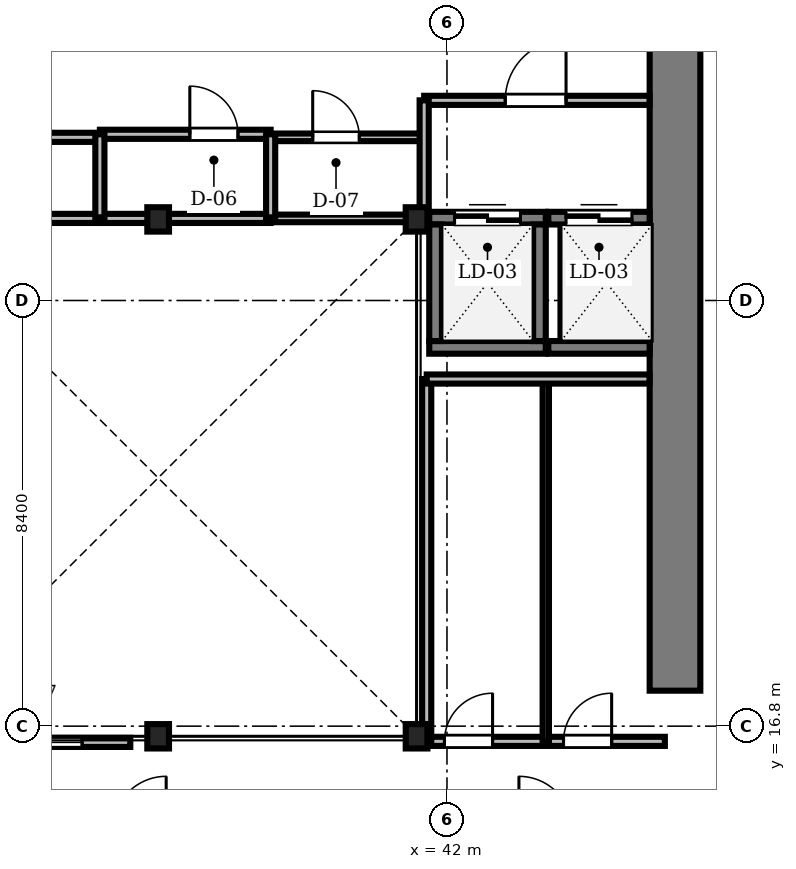
"""IFC4 building model, lengths in metres.
Left out: names, types, materials, properties, quantities, classifications, styles, units other than length and angle.
Written with IfcOpenShell. Run it as: python <this file> out.ifc"""

import sys

from ifc_helpers import new_model, si_unit, direction, frame, frame_2d, origin, origin_2d, place, context, subcontext, project, spatial, rectangle, i_section, extrude, source, transform, mapped, element, fill, save


model = new_model("IFC4")
c1 = context("Model", 3, precision=1e-05, world=origin(), true_north=direction((0.0, 1.0)))
c2 = subcontext(c1, "Body", "Model", "MODEL_VIEW")
j1 = project(units=[si_unit("LENGTHUNIT", "METRE"), si_unit("PLANEANGLEUNIT", "RADIAN")], contexts=[c1])
p1 = place(None, origin())
s1 = spatial("IfcSite", under=j1, at=p1, CompositionType="ELEMENT")
p2 = place(p1, origin())
s2 = spatial("IfcBuilding", under=s1, at=p2, CompositionType="ELEMENT")
p3 = place(p2, frame((0.0, 0.0, 78.7)))
s3 = spatial("IfcBuildingStorey", under=s2, at=p3, CompositionType="ELEMENT", Elevation=78.7)
m1 = source(origin(), c2, "Body", "SweptSolid", [
    extrude(rectangle(XDim=13.15, YDim=1.0, at=frame_2d((6.575, 0.0))), origin(), (0.0, 0.0, 1.0), 3.41),
])
p4 = place(p3, frame((46.5, 17.5, 0.0), z_axis=(0.0, 0.0, 1.0), x_axis=(0.0, 1.0, 0.0)))
e1 = element("IfcWall", 1, at=p4, inside=s3, PredefinedType="SHEAR", context=c2, shape_type="MappedRepresentation", body=[
    mapped(m1, transform((0.0, 0.0, 0.0), scale=1.0)),
])
m2 = source(origin(), c2, "Body", "SweptSolid", [
    extrude(i_section(OverallWidth=0.428, OverallDepth=0.481, WebThickness=0.04, FlangeThickness=0.063, FilletRadius=0.015, at=origin_2d()), origin(), (0.0, 0.0, 1.0), 3.41),
])
for number, where, z_axis, x_axis in (
    (2, (36.3, 16.6, 0.0), (0.0, 0.0, 1.0), (1.0, 0.0, 0.0)),
    (3, (41.4, 16.6, 0.0), (0.0, 0.0, 1.0), (1.0, 0.0, 0.0)),
    (4, (41.4, 26.8, 0.0), (0.0, 0.0, 1.0), (1.0, 0.0, 0.0)),
    (5, (36.3, 26.8, 0.0), (0.0, 0.0, 1.0), (1.0, 0.0, 0.0)),
):
    element("IfcColumn", number, at=place(p3, frame(where, z_axis=z_axis, x_axis=x_axis)), inside=s3, PredefinedType="COLUMN", context=c2, shape_type="MappedRepresentation", body=[
        mapped(m2, transform((0.0, 0.0, 0.0), scale=1.0)),
    ])
m3 = source(origin(), c2, "Body", "SweptSolid", [
    extrude(rectangle(XDim=2.3, YDim=0.25, at=frame_2d((1.15, 0.0))), origin(), (0.0, 0.0, 1.0), 3.41),
])
p5 = place(p3, frame((41.65, 24.275, 0.0), z_axis=(0.0, 0.0, 1.0), x_axis=(1.0, 0.0, 0.0)))
e6 = element("IfcWall", 6, at=p5, inside=s3, PredefinedType="SOLIDWALL", context=c2, shape_type="MappedRepresentation", body=[
    mapped(m3, transform((0.0, 0.0, 0.0), scale=1.0)),
])
p6 = place(p3, frame((41.65, 26.825, 0.0), z_axis=(0.0, 0.0, 1.0), x_axis=(1.0, 0.0, 0.0)))
e7 = element("IfcWall", 7, at=p6, inside=s3, PredefinedType="SOLIDWALL", context=c2, shape_type="MappedRepresentation", body=[
    mapped(m3, transform((0.0, 0.0, 0.0), scale=1.0)),
])
m4 = source(origin(), c2, "Body", "SweptSolid", [
    extrude(rectangle(XDim=1.3, YDim=2.3, at=frame_2d((0.65, 1.15))), frame((0.0, 0.135, 0.0), z_axis=(0.0, -1.0, 0.0), x_axis=(1.0, 0.0, 0.0)), (0.0, 0.0, 1.0), 0.27),
])
p7 = place(p6, frame((0.5, 0.0, 0.0)))
e8 = element("IfcOpeningElement", 8, at=p7, cuts=e7, PredefinedType="OPENING", context=c2, shape_type="MappedRepresentation", body=[
    mapped(m4, transform((0.0, 0.0, 0.0), scale=1.0)),
])
for number, where, z_axis, x_axis in (
    (9, (41.775, 24.4, 0.0), (0.0, 0.0, 1.0), (0.0, 1.0, 0.0)),
    (10, (43.825, 24.4, 0.0), (0.0, 0.0, 1.0), (0.0, 1.0, 0.0)),
):
    element("IfcWall", number, at=place(p3, frame(where, z_axis=z_axis, x_axis=x_axis)), inside=s3, PredefinedType="SOLIDWALL", context=c2, shape_type="MappedRepresentation", body=[
        mapped(m3, transform((0.0, 0.0, 0.0), scale=1.0)),
    ])
m5 = source(origin(), c2, "Body", "SweptSolid", [
    extrude(rectangle(XDim=2.0, YDim=0.25, at=frame_2d((1.0, 0.0))), origin(), (0.0, 0.0, 1.0), 3.41),
])
p8 = place(p3, frame((44.0, 24.275, 0.0), z_axis=(0.0, 0.0, 1.0), x_axis=(1.0, 0.0, 0.0)))
e11 = element("IfcWall", 11, at=p8, inside=s3, PredefinedType="SOLIDWALL", context=c2, shape_type="MappedRepresentation", body=[
    mapped(m5, transform((0.0, 0.0, 0.0), scale=1.0)),
])
p9 = place(p3, frame((44.0, 26.825, 0.0), z_axis=(0.0, 0.0, 1.0), x_axis=(1.0, 0.0, 0.0)))
e12 = element("IfcWall", 12, at=p9, inside=s3, PredefinedType="SOLIDWALL", context=c2, shape_type="MappedRepresentation", body=[
    mapped(m5, transform((0.0, 0.0, 0.0), scale=1.0)),
])
p10 = place(p9, frame((0.35, 0.0, 0.0)))
e13 = element("IfcOpeningElement", 13, at=p10, cuts=e12, PredefinedType="OPENING", context=c2, shape_type="MappedRepresentation", body=[
    mapped(m4, transform((0.0, 0.0, 0.0), scale=1.0)),
])
m6 = source(origin(), c2, "Body", "SweptSolid", [
    extrude(rectangle(XDim=4.448, YDim=0.18, at=frame_2d((2.224, 0.0))), origin(), (0.0, 0.0, 1.0), 3.042),
])
p11 = place(p3, frame((41.55, 29.15, 0.0), z_axis=(0.0, 0.0, 1.0), x_axis=(1.0, 0.0, 0.0)))
e14 = element("IfcWall", 14, at=p11, inside=s3, PredefinedType="PARTITIONING", context=c2, shape_type="MappedRepresentation", body=[
    mapped(m6, transform((0.0, 0.0, 0.0), scale=1.0)),
])
m7 = source(origin(), c2, "Body", "SweptSolid", [
    extrude(rectangle(XDim=1.2, YDim=2.2, at=frame_2d((0.6, 1.1))), frame((0.0, 0.1, 0.0), z_axis=(0.0, -1.0, 0.0), x_axis=(1.0, 0.0, 0.0)), (0.0, 0.0, 1.0), 0.2),
])
p12 = place(p11, frame((1.6, 0.0, 0.0)))
e15 = element("IfcOpeningElement", 15, at=p12, cuts=e14, PredefinedType="OPENING", context=c2, shape_type="MappedRepresentation", body=[
    mapped(m7, transform((0.0, 0.0, 0.0), scale=1.0)),
])
m8 = source(origin(), c2, "Body", "SweptSolid", [
    extrude(rectangle(XDim=4.7, YDim=0.18, at=frame_2d((2.35, 0.0))), origin(), (0.0, 0.0, 1.0), 2.802),
])
p13 = place(p3, frame((41.6, 16.5, 0.0), z_axis=(0.0, 0.0, 1.0), x_axis=(1.0, 0.0, 0.0)))
e16 = element("IfcWall", 16, at=p13, inside=s3, PredefinedType="PARTITIONING", context=c2, shape_type="MappedRepresentation", body=[
    mapped(m8, transform((0.0, 0.0, 0.0), scale=1.0)),
])
m9 = source(origin(), c2, "Body", "SweptSolid", [
    extrude(rectangle(XDim=0.95, YDim=2.15, at=frame_2d((0.475, 1.075))), frame((0.0, 0.1, 0.0), z_axis=(0.0, -1.0, 0.0), x_axis=(1.0, 0.0, 0.0)), (0.0, 0.0, 1.0), 0.2),
])
p14 = place(p13, frame((0.35, 0.0, 0.0)))
e17 = element("IfcOpeningElement", 17, at=p14, cuts=e16, PredefinedType="OPENING", context=c2, shape_type="MappedRepresentation", body=[
    mapped(m9, transform((0.0, 0.0, 0.0), scale=1.0)),
])
p15 = place(p13, frame((2.7, 0.0, 0.0)))
e18 = element("IfcOpeningElement", 18, at=p15, cuts=e16, PredefinedType="OPENING", context=c2, shape_type="MappedRepresentation", body=[
    mapped(m9, transform((0.0, 0.0, 0.0), scale=1.0)),
])
m10 = source(origin(), c2, "Body", "SweptSolid", [
    extrude(rectangle(XDim=3.7, YDim=0.18, at=frame_2d((1.85, 0.0))), origin(), (0.0, 0.0, 1.0), 3.042),
])
p16 = place(p3, frame((31.45, 28.42, 0.0), z_axis=(0.0, 0.0, 1.0), x_axis=(1.0, 0.0, 0.0)))
e19 = element("IfcWall", 19, at=p16, inside=s3, PredefinedType="PARTITIONING", context=c2, shape_type="MappedRepresentation", body=[
    mapped(m10, transform((0.0, 0.0, 0.0), scale=1.0)),
])
m11 = source(origin(), c2, "Body", "SweptSolid", [
    extrude(rectangle(XDim=0.92, YDim=2.1, at=frame_2d((0.46, 1.05))), frame((0.0, 0.1, 0.0), z_axis=(0.0, -1.0, 0.0), x_axis=(1.0, 0.0, 0.0)), (0.0, 0.0, 1.0), 0.2),
])
p17 = place(p16, frame((0.9, 0.0, 0.0)))
e20 = element("IfcOpeningElement", 20, at=p17, cuts=e19, PredefinedType="OPENING", context=c2, shape_type="MappedRepresentation", body=[
    mapped(m11, transform((0.0, 0.0, 0.0), scale=1.0)),
])
m12 = source(origin(), c2, "Body", "SweptSolid", [
    extrude(rectangle(XDim=3.37, YDim=0.18, at=frame_2d((1.685, 0.0))), origin(), (0.0, 0.0, 1.0), 3.41),
])
p18 = place(p3, frame((35.15, 28.48, 0.0), z_axis=(0.0, 0.0, 1.0), x_axis=(1.0, 0.0, 0.0)))
e21 = element("IfcWall", 21, at=p18, inside=s3, PredefinedType="PARTITIONING", context=c2, shape_type="MappedRepresentation", body=[
    mapped(m12, transform((0.0, 0.0, 0.0), scale=1.0)),
])
p19 = place(p18, frame((1.775, 0.0, 0.0)))
e22 = element("IfcOpeningElement", 22, at=p19, cuts=e21, PredefinedType="OPENING", context=c2, shape_type="MappedRepresentation", body=[
    mapped(m9, transform((0.0, 0.0, 0.0), scale=1.0)),
])
m13 = source(origin(), c2, "Body", "SweptSolid", [
    extrude(rectangle(XDim=3.0, YDim=0.15, at=frame_2d((1.5, 0.0))), origin(), (0.0, 0.0, 1.0), 3.41),
])
p20 = place(p3, frame((38.52, 28.42, 0.0), z_axis=(0.0, 0.0, 1.0), x_axis=(1.0, 0.0, 0.0)))
e23 = element("IfcWall", 23, at=p20, inside=s3, PredefinedType="PARTITIONING", context=c2, shape_type="MappedRepresentation", body=[
    mapped(m13, transform((0.0, 0.0, 0.0), scale=1.0)),
])
m14 = source(origin(), c2, "Body", "SweptSolid", [
    extrude(rectangle(XDim=0.92, YDim=2.1, at=frame_2d((0.46, 1.05))), frame((0.0, 0.085, 0.0), z_axis=(0.0, -1.0, 0.0), x_axis=(1.0, 0.0, 0.0)), (0.0, 0.0, 1.0), 0.17),
])
p21 = place(p20, frame((0.83, 0.0, 0.0)))
e24 = element("IfcOpeningElement", 24, at=p21, cuts=e23, PredefinedType="OPENING", context=c2, shape_type="MappedRepresentation", body=[
    mapped(m14, transform((0.0, 0.0, 0.0), scale=1.0)),
])
m15 = source(origin(), c2, "Body", "SweptSolid", [
    extrude(rectangle(XDim=7.15, YDim=0.18, at=frame_2d((3.575, 0.0))), origin(), (0.0, 0.0, 1.0), 2.802),
])
p22 = place(p3, frame((41.6, 16.5, 0.0), z_axis=(0.0, 0.0, 1.0), x_axis=(0.0, 1.0, 0.0)))
e25 = element("IfcWall", 25, at=p22, inside=s3, PredefinedType="PARTITIONING", context=c2, shape_type="MappedRepresentation", body=[
    mapped(m15, transform((0.0, 0.0, 0.0), scale=1.0)),
])
m16 = source(origin(), c2, "Body", "SweptSolid", [
    extrude(rectangle(XDim=7.15, YDim=0.125, at=frame_2d((3.575, 0.0))), origin(), (0.0, 0.0, 1.0), 2.802),
])
p23 = place(p3, frame((43.95, 16.5, 0.0), z_axis=(0.0, 0.0, 1.0), x_axis=(0.0, 1.0, 0.0)))
e26 = element("IfcWall", 26, at=p23, inside=s3, PredefinedType="PARTITIONING", context=c2, shape_type="MappedRepresentation", body=[
    mapped(m16, transform((0.0, 0.0, 0.0), scale=1.0)),
])
m17 = source(origin(), c2, "Body", "SweptSolid", [
    extrude(rectangle(XDim=4.398, YDim=0.18, at=frame_2d((2.199, 0.0))), origin(), (0.0, 0.0, 1.0), 3.41),
])
p24 = place(p3, frame((41.6, 23.65, 0.0), z_axis=(0.0, 0.0, 1.0), x_axis=(1.0, 0.0, 0.0)))
e27 = element("IfcWall", 27, at=p24, inside=s3, PredefinedType="PARTITIONING", context=c2, shape_type="MappedRepresentation", body=[
    mapped(m17, transform((0.0, 0.0, 0.0), scale=1.0)),
])
m18 = source(origin(), c2, "Body", "SweptSolid", [
    extrude(rectangle(XDim=3.7, YDim=0.18, at=frame_2d((1.85, 0.0))), origin(), (0.0, 0.0, 1.0), 2.952),
])
p25 = place(p3, frame((31.45, 26.82, 0.0), z_axis=(0.0, 0.0, 1.0), x_axis=(1.0, 0.0, 0.0)))
e28 = element("IfcWall", 28, at=p25, inside=s3, PredefinedType="PARTITIONING", context=c2, shape_type="MappedRepresentation", body=[
    mapped(m18, transform((0.0, 0.0, 0.0), scale=1.0)),
])
m19 = source(origin(), c2, "Body", "SweptSolid", [
    extrude(rectangle(XDim=3.37, YDim=0.18, at=frame_2d((1.685, 0.0))), origin(), (0.0, 0.0, 1.0), 2.952),
])
p26 = place(p3, frame((35.15, 26.82, 0.0), z_axis=(0.0, 0.0, 1.0), x_axis=(1.0, 0.0, 0.0)))
e29 = element("IfcWall", 29, at=p26, inside=s3, PredefinedType="PARTITIONING", context=c2, shape_type="MappedRepresentation", body=[
    mapped(m19, transform((0.0, 0.0, 0.0), scale=1.0)),
])
m20 = source(origin(), c2, "Body", "SweptSolid", [
    extrude(rectangle(XDim=3.0, YDim=0.15, at=frame_2d((1.5, 0.0))), origin(), (0.0, 0.0, 1.0), 2.802),
])
p27 = place(p3, frame((38.52, 26.82, 0.0), z_axis=(0.0, 0.0, 1.0), x_axis=(1.0, 0.0, 0.0)))
e30 = element("IfcWall", 30, at=p27, inside=s3, PredefinedType="PARTITIONING", context=c2, shape_type="MappedRepresentation", body=[
    mapped(m20, transform((0.0, 0.0, 0.0), scale=1.0)),
])
m21 = source(origin(), c2, "Body", "SweptSolid", [
    extrude(rectangle(XDim=2.35, YDim=0.18, at=frame_2d((1.175, 0.0))), origin(), (0.0, 0.0, 1.0), 2.802),
])
p28 = place(p3, frame((41.55, 26.8, 0.0), z_axis=(0.0, 0.0, 1.0), x_axis=(0.0, 1.0, 0.0)))
e31 = element("IfcWall", 31, at=p28, inside=s3, PredefinedType="PARTITIONING", context=c2, shape_type="MappedRepresentation", body=[
    mapped(m21, transform((0.0, 0.0, 0.0), scale=1.0)),
])
m22 = source(origin(), c2, "Body", "SweptSolid", [
    extrude(rectangle(XDim=1.66, YDim=0.18, at=frame_2d((0.83, 0.0))), origin(), (0.0, 0.0, 1.0), 2.952),
])
for number, where, z_axis, x_axis in (
    (32, (35.15, 26.82, 0.0), (0.0, 0.0, 1.0), (0.0, 1.0, 0.0)),
    (33, (38.52, 26.82, 0.0), (0.0, 0.0, 1.0), (0.0, 1.0, 0.0)),
):
    element("IfcWall", number, at=place(p3, frame(where, z_axis=z_axis, x_axis=x_axis)), inside=s3, PredefinedType="PARTITIONING", context=c2, shape_type="MappedRepresentation", body=[
        mapped(m22, transform((0.0, 0.0, 0.0), scale=1.0)),
    ])
m23 = source(origin(), c2, "Body", "SweptSolid", [
    extrude(rectangle(XDim=3.9, YDim=0.18, at=frame_2d((1.95, 0.0))), origin(), (0.0, 0.0, 1.0), 2.952),
])
p29 = place(p3, frame((31.85, 16.48, 0.0), z_axis=(0.0, 0.0, 1.0), x_axis=(1.0, 0.0, 0.0)))
e34 = element("IfcWall", 34, at=p29, inside=s3, PredefinedType="PARTITIONING", context=c2, shape_type="MappedRepresentation", body=[
    mapped(m23, transform((0.0, 0.0, 0.0), scale=1.0)),
])
m24 = source(origin(), c2, "Body", "SweptSolid", [
    extrude(rectangle(XDim=2.0, YDim=1.9, at=frame_2d((1.0, 0.95))), frame((0.0, 0.1, 0.0), z_axis=(0.0, -1.0, 0.0), x_axis=(1.0, 0.0, 0.0)), (0.0, 0.0, 1.0), 0.2),
])
p30 = place(p29, frame((0.95, 0.0, 0.55)))
e35 = element("IfcOpeningElement", 35, at=p30, cuts=e34, PredefinedType="OPENING", context=c2, shape_type="MappedRepresentation", body=[
    mapped(m24, transform((0.0, 0.0, 0.0), scale=1.0)),
])
m25 = source(origin(), c2, "Body", "SweptSolid", [
    extrude(rectangle(XDim=1.3, YDim=2.3, at=frame_2d((0.65, 1.15))), frame((0.0, 0.025, 0.0), z_axis=(0.0, -1.0, 0.0), x_axis=(1.0, 0.0, 0.0)), (0.0, 0.0, 1.0), 0.05),
])
p31 = place(p7, origin())
e36 = element("IfcDoor", 36, at=p31, inside=s3, OperationType="DOUBLE_DOOR_SLIDING", PredefinedType="DOOR", context=c2, shape_type="MappedRepresentation", body=[
    mapped(m25, transform((0.0, 0.0, 0.0), scale=1.0)),
])
fill(e8, e36)
p32 = place(p10, origin())
e37 = element("IfcDoor", 37, at=p32, inside=s3, OperationType="DOUBLE_DOOR_SLIDING", PredefinedType="DOOR", context=c2, shape_type="MappedRepresentation", body=[
    mapped(m25, transform((0.0, 0.0, 0.0), scale=1.0)),
])
fill(e13, e37)
m26 = source(origin(), c2, "Body", "SweptSolid", [
    extrude(rectangle(XDim=1.2, YDim=2.2, at=frame_2d((0.6, 1.1))), frame((0.0, 0.025, 0.0), z_axis=(0.0, -1.0, 0.0), x_axis=(1.0, 0.0, 0.0)), (0.0, 0.0, 1.0), 0.05),
])
p33 = place(p12, origin())
e38 = element("IfcDoor", 38, at=p33, inside=s3, OperationType="SINGLE_SWING_RIGHT", PredefinedType="DOOR", context=c2, shape_type="MappedRepresentation", body=[
    mapped(m26, transform((0.0, 0.0, 0.0), scale=1.0)),
])
fill(e15, e38)
m27 = source(origin(), c2, "Body", "SweptSolid", [
    extrude(rectangle(XDim=0.95, YDim=2.15, at=frame_2d((0.475, 1.075))), frame((0.0, 0.025, 0.0), z_axis=(0.0, -1.0, 0.0), x_axis=(1.0, 0.0, 0.0)), (0.0, 0.0, 1.0), 0.05),
])
p34 = place(p14, origin())
e39 = element("IfcDoor", 39, at=p34, inside=s3, OperationType="SINGLE_SWING_RIGHT", PredefinedType="DOOR", context=c2, shape_type="MappedRepresentation", body=[
    mapped(m27, transform((0.0, 0.0, 0.0), scale=1.0)),
])
fill(e17, e39)
p35 = place(p15, origin())
e40 = element("IfcDoor", 40, at=p35, inside=s3, OperationType="SINGLE_SWING_RIGHT", PredefinedType="DOOR", context=c2, shape_type="MappedRepresentation", body=[
    mapped(m27, transform((0.0, 0.0, 0.0), scale=1.0)),
])
fill(e18, e40)
p36 = place(p19, origin())
e41 = element("IfcDoor", 41, at=p36, inside=s3, OperationType="SINGLE_SWING_LEFT", PredefinedType="DOOR", context=c2, shape_type="MappedRepresentation", body=[
    mapped(m27, transform((0.0, 0.0, 0.0), scale=1.0)),
])
fill(e22, e41)
m28 = source(origin(), c2, "Body", "SweptSolid", [
    extrude(rectangle(XDim=0.92, YDim=2.1, at=frame_2d((0.46, 1.05))), frame((0.0, 0.025, 0.0), z_axis=(0.0, -1.0, 0.0), x_axis=(1.0, 0.0, 0.0)), (0.0, 0.0, 1.0), 0.05),
])
p37 = place(p21, origin())
e42 = element("IfcDoor", 42, at=p37, inside=s3, OperationType="SINGLE_SWING_LEFT", PredefinedType="DOOR", context=c2, shape_type="MappedRepresentation", body=[
    mapped(m28, transform((0.0, 0.0, 0.0), scale=1.0)),
])
fill(e24, e42)
m29 = source(origin(), c2, "Body", "SweptSolid", [
    extrude(rectangle(XDim=2.0, YDim=1.9, at=frame_2d((1.0, 0.95))), frame((0.0, 0.03, 0.0), z_axis=(0.0, -1.0, 0.0), x_axis=(1.0, 0.0, 0.0)), (0.0, 0.0, 1.0), 0.06),
])
p38 = place(p30, origin())
e43 = element("IfcWindow", 43, at=p38, inside=s3, PartitioningType="SINGLE_PANEL", PredefinedType="WINDOW", context=c2, shape_type="MappedRepresentation", body=[
    mapped(m29, transform((0.0, 0.0, 0.0), scale=1.0)),
])
fill(e35, e43)
save(model, sys.argv[1])
